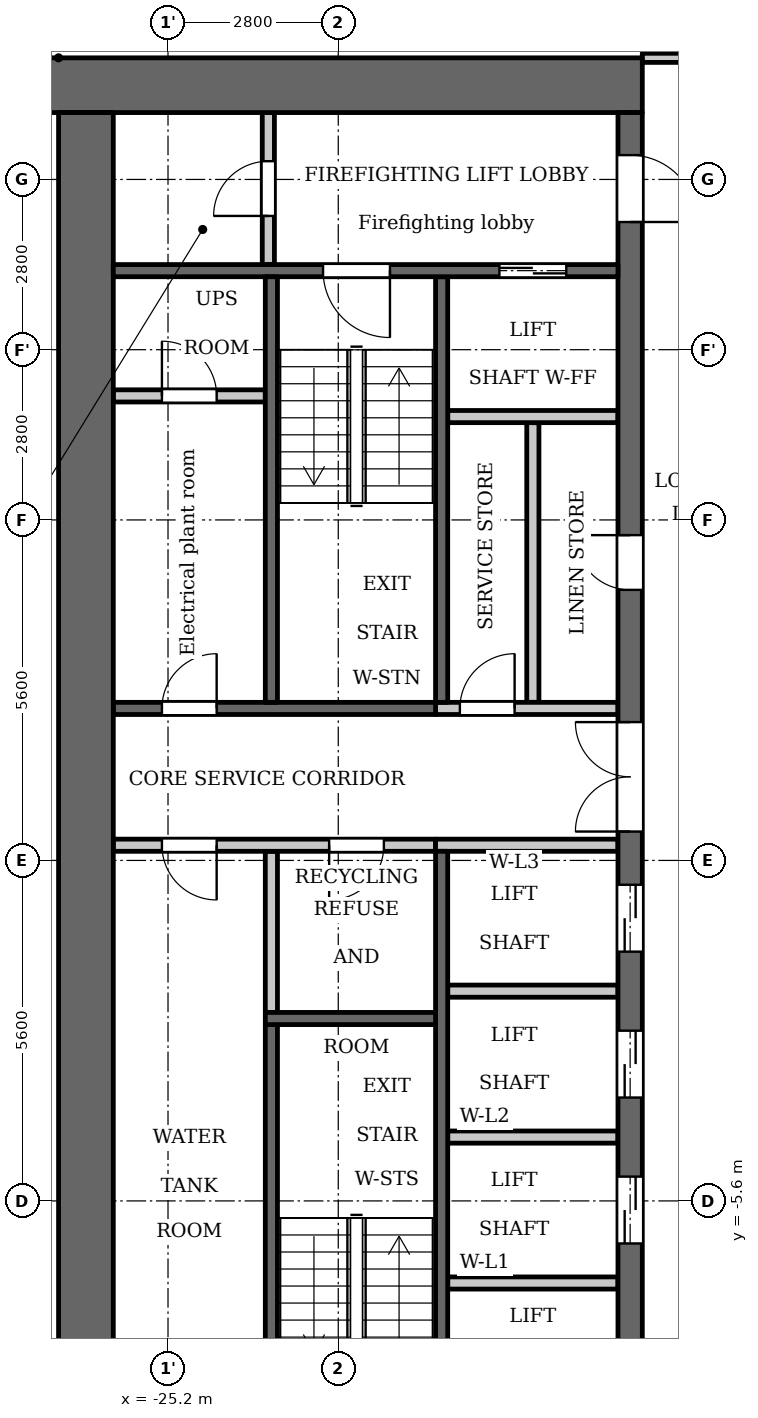
"""IFC4 building model, lengths in metres.
Left out: names, types, materials, properties, quantities, classifications, styles, units other than length and angle.
Written with IfcOpenShell. Run it as: python <this file> out.ifc"""

import sys

from ifc_helpers import new_model, si_unit, direction, frame, frame_2d, origin, place, context, subcontext, project, spatial, rectangle, extrude, element, fill, save


model = new_model("IFC4")
c1 = context("Model", 3, precision=1e-05, world=origin(), true_north=direction((0.0, 1.0)))
c2 = subcontext(c1, "Body", "Model", "MODEL_VIEW")
j1 = project(units=[si_unit("LENGTHUNIT", "METRE"), si_unit("PLANEANGLEUNIT", "RADIAN")], contexts=[c1])
p1 = place(None, origin())
s1 = spatial("IfcSite", under=j1, at=p1, CompositionType="ELEMENT")
p2 = place(p1, origin())
s2 = spatial("IfcBuilding", under=s1, at=p2, CompositionType="ELEMENT")
p3 = place(p2, frame((0.0, 0.0, 62.0)))
s3 = spatial("IfcBuildingStorey", under=s2, at=p3, CompositionType="ELEMENT", Elevation=62.0)
p4 = place(p3, frame((-23.5, -2.5, 0.0), z_axis=(0.0, 0.0, 1.0), x_axis=(0.0, 1.0, 0.0)))
e1 = element("IfcWall", 1, at=p4, inside=s3, PredefinedType="PARTITIONING", context=c2, shape_type="SweptSolid", body=[
    extrude(rectangle(XDim=2.65, YDim=0.2, at=frame_2d((1.325, 0.0))), origin(), (0.0, 0.0, 1.0), 3.2),
])
p5 = place(p3, frame((-20.7, 2.6, 0.0), z_axis=(0.0, 0.0, 1.0), x_axis=(0.0, 1.0, 0.0)))
e2 = element("IfcWall", 2, at=p5, inside=s3, PredefinedType="SHEAR", context=c2, shape_type="SweptSolid", body=[
    extrude(rectangle(XDim=7.0, YDim=0.2, at=frame_2d((3.5, 0.0))), origin(), (0.0, 0.0, 1.0), 3.2),
])
p6 = place(p3, frame((-20.7, -9.6, 0.0), z_axis=(0.0, 0.0, 1.0), x_axis=(0.0, 1.0, 0.0)))
e3 = element("IfcWall", 3, at=p6, inside=s3, PredefinedType="SHEAR", context=c2, shape_type="SweptSolid", body=[
    extrude(rectangle(XDim=9.75, YDim=0.2, at=frame_2d((4.875, 0.0))), origin(), (0.0, 0.0, 1.0), 3.2),
])
p7 = place(p3, frame((-20.8, 2.5, 0.0), z_axis=(0.0, 0.0, 1.0), x_axis=(-1.0, 0.0, 0.0)))
e4 = element("IfcWall", 4, at=p7, inside=s3, PredefinedType="SHEAR", context=c2, shape_type="SweptSolid", body=[
    extrude(rectangle(XDim=5.3, YDim=0.2, at=frame_2d((2.65, 0.0))), origin(), (0.0, 0.0, 1.0), 3.2),
])
p8 = place(p7, frame((3.6, 0.0, 0.0)))
e5 = element("IfcOpeningElement", 5, at=p8, cuts=e4, PredefinedType="OPENING", context=c2, shape_type="SweptSolid", body=[
    extrude(rectangle(XDim=0.9, YDim=2.1, at=frame_2d((0.45, 1.05))), frame((0.0, 0.11, 0.0), z_axis=(0.0, -1.0, 0.0), x_axis=(1.0, 0.0, 0.0)), (0.0, 0.0, 1.0), 0.22),
])
p9 = place(p3, frame((-20.8, 0.25, 0.0), z_axis=(0.0, 0.0, 1.0), x_axis=(-1.0, 0.0, 0.0)))
e6 = element("IfcWall", 6, at=p9, inside=s3, PredefinedType="PARTITIONING", context=c2, shape_type="SweptSolid", body=[
    extrude(rectangle(XDim=5.3, YDim=0.2, at=frame_2d((2.65, 0.0))), origin(), (0.0, 0.0, 1.0), 3.2),
])
p10 = place(p9, frame((0.85, 0.0, 0.0)))
e7 = element("IfcOpeningElement", 7, at=p10, cuts=e6, PredefinedType="OPENING", context=c2, shape_type="SweptSolid", body=[
    extrude(rectangle(XDim=0.9, YDim=2.1, at=frame_2d((0.45, 1.05))), frame((0.0, 0.11, 0.0), z_axis=(0.0, -1.0, 0.0), x_axis=(1.0, 0.0, 0.0)), (0.0, 0.0, 1.0), 0.22),
])
p11 = place(p9, frame((3.6, 0.0, 0.0)))
e8 = element("IfcOpeningElement", 8, at=p11, cuts=e6, PredefinedType="OPENING", context=c2, shape_type="SweptSolid", body=[
    extrude(rectangle(XDim=0.9, YDim=2.1, at=frame_2d((0.45, 1.05))), frame((0.0, 0.11, 0.0), z_axis=(0.0, -1.0, 0.0), x_axis=(1.0, 0.0, 0.0)), (0.0, 0.0, 1.0), 0.22),
])
p12 = place(p3, frame((-17.4, 12.75, 0.0), z_axis=(0.0, 0.0, 1.0), x_axis=(-1.0, 0.0, 0.0)))
e9 = element("IfcWall", 9, at=p12, inside=s3, PredefinedType="SHEAR", context=c2, shape_type="SweptSolid", body=[
    extrude(rectangle(XDim=10.4, YDim=0.9, at=frame_2d((5.2, 0.0))), origin(), (0.0, 0.0, 1.0), 3.2),
])
p13 = place(p3, frame((-19.2, 2.6, 0.0), z_axis=(0.0, 0.0, 1.0), x_axis=(0.0, 1.0, 0.0)))
e10 = element("IfcWall", 10, at=p13, inside=s3, PredefinedType="PARTITIONING", context=c2, shape_type="SweptSolid", body=[
    extrude(rectangle(XDim=4.6, YDim=0.2, at=frame_2d((2.3, 0.0))), origin(), (0.0, 0.0, 1.0), 3.2),
])
p14 = place(p3, frame((-17.6, -12.3, 0.0), z_axis=(0.0, 0.0, 1.0), x_axis=(0.0, 1.0, 0.0)))
e11 = element("IfcWall", 11, at=p14, inside=s3, PredefinedType="SHEAR", context=c2, shape_type="SweptSolid", body=[
    extrude(rectangle(XDim=24.6, YDim=0.4, at=frame_2d((12.3, 0.0))), origin(), (0.0, 0.0, 1.0), 3.2),
])
p15 = place(p14, frame((6.0, 0.0, 0.0)))
e12 = element("IfcOpeningElement", 12, at=p15, cuts=e11, PredefinedType="OPENING", context=c2, shape_type="SweptSolid", body=[
    extrude(rectangle(XDim=1.1, YDim=2.1, at=frame_2d((0.55, 1.05))), frame((0.0, 0.21, 0.0), z_axis=(0.0, -1.0, 0.0), x_axis=(1.0, 0.0, 0.0)), (0.0, 0.0, 1.0), 0.42),
])
p16 = place(p14, frame((8.4, 0.0, 0.0)))
e13 = element("IfcOpeningElement", 13, at=p16, cuts=e11, PredefinedType="OPENING", context=c2, shape_type="SweptSolid", body=[
    extrude(rectangle(XDim=1.1, YDim=2.1, at=frame_2d((0.55, 1.05))), frame((0.0, 0.21, 0.0), z_axis=(0.0, -1.0, 0.0), x_axis=(1.0, 0.0, 0.0)), (0.0, 0.0, 1.0), 0.42),
])
p17 = place(p14, frame((10.8, 0.0, 0.0)))
e14 = element("IfcOpeningElement", 14, at=p17, cuts=e11, PredefinedType="OPENING", context=c2, shape_type="SweptSolid", body=[
    extrude(rectangle(XDim=1.1, YDim=2.1, at=frame_2d((0.55, 1.05))), frame((0.0, 0.21, 0.0), z_axis=(0.0, -1.0, 0.0), x_axis=(1.0, 0.0, 0.0)), (0.0, 0.0, 1.0), 0.42),
])
p18 = place(p14, frame((16.75, 0.0, 0.0)))
e15 = element("IfcOpeningElement", 15, at=p18, cuts=e11, PredefinedType="OPENING", context=c2, shape_type="SweptSolid", body=[
    extrude(rectangle(XDim=0.9, YDim=2.1, at=frame_2d((0.45, 1.05))), frame((0.0, 0.21, 0.0), z_axis=(0.0, -1.0, 0.0), x_axis=(1.0, 0.0, 0.0)), (0.0, 0.0, 1.0), 0.42),
])
p19 = place(p14, frame((22.8, 0.0, 0.0)))
e16 = element("IfcOpeningElement", 16, at=p19, cuts=e11, PredefinedType="OPENING", context=c2, shape_type="SweptSolid", body=[
    extrude(rectangle(XDim=1.1, YDim=2.1, at=frame_2d((0.55, 1.05))), frame((0.0, 0.21, 0.0), z_axis=(0.0, -1.0, 0.0), x_axis=(1.0, 0.0, 0.0)), (0.0, 0.0, 1.0), 0.42),
])
p20 = place(p14, frame((0.7, 0.0, 0.0)))
e17 = element("IfcOpeningElement", 17, at=p20, cuts=e11, PredefinedType="OPENING", context=c2, shape_type="SweptSolid", body=[
    extrude(rectangle(XDim=1.1, YDim=2.1, at=frame_2d((0.55, 1.05))), frame((0.0, 0.21, 0.0), z_axis=(0.0, -1.0, 0.0), x_axis=(1.0, 0.0, 0.0)), (0.0, 0.0, 1.0), 0.42),
])
p21 = place(p14, frame((12.775, 0.0, 0.0)))
e18 = element("IfcOpeningElement", 18, at=p21, cuts=e11, PredefinedType="OPENING", context=c2, shape_type="SweptSolid", body=[
    extrude(rectangle(XDim=1.8, YDim=2.1, at=frame_2d((0.9, 1.05))), frame((0.0, 0.21, 0.0), z_axis=(0.0, -1.0, 0.0), x_axis=(1.0, 0.0, 0.0)), (0.0, 0.0, 1.0), 0.42),
])
p22 = place(p3, frame((-26.55, -12.3, 0.0), z_axis=(0.0, 0.0, 1.0), x_axis=(0.0, 1.0, 0.0)))
e19 = element("IfcWall", 19, at=p22, inside=s3, PredefinedType="SHEAR", context=c2, shape_type="SweptSolid", body=[
    extrude(rectangle(XDim=24.6, YDim=0.9, at=frame_2d((12.3, 0.0))), origin(), (0.0, 0.0, 1.0), 3.2),
])
p23 = place(p3, frame((-23.55, 9.8, 0.0), z_axis=(0.0, 0.0, 1.0), x_axis=(0.0, 1.0, 0.0)))
e20 = element("IfcWall", 20, at=p23, inside=s3, PredefinedType="PARTITIONING", context=c2, shape_type="SweptSolid", body=[
    extrude(rectangle(XDim=2.5, YDim=0.2, at=frame_2d((1.25, 0.0))), origin(), (0.0, 0.0, 1.0), 3.2),
])
p24 = place(p23, frame((0.8, 0.0, 0.0)))
e21 = element("IfcOpeningElement", 21, at=p24, cuts=e20, PredefinedType="OPENING", context=c2, shape_type="SweptSolid", body=[
    extrude(rectangle(XDim=0.9, YDim=2.1, at=frame_2d((0.45, 1.05))), frame((0.0, 0.11, 0.0), z_axis=(0.0, -1.0, 0.0), x_axis=(1.0, 0.0, 0.0)), (0.0, 0.0, 1.0), 0.22),
])
p25 = place(p3, frame((-23.6, 7.64, 0.0), z_axis=(0.0, 0.0, 1.0), x_axis=(-1.0, 0.0, 0.0)))
e22 = element("IfcWall", 22, at=p25, inside=s3, PredefinedType="PARTITIONING", context=c2, shape_type="SweptSolid", body=[
    extrude(rectangle(XDim=2.5, YDim=0.2, at=frame_2d((1.25, 0.0))), origin(), (0.0, 0.0, 1.0), 3.2),
])
p26 = place(p25, frame((0.8, 0.0, 0.0)))
e23 = element("IfcOpeningElement", 23, at=p26, cuts=e22, PredefinedType="OPENING", context=c2, shape_type="SweptSolid", body=[
    extrude(rectangle(XDim=0.9, YDim=2.1, at=frame_2d((0.45, 1.05))), frame((0.0, 0.11, 0.0), z_axis=(0.0, -1.0, 0.0), x_axis=(1.0, 0.0, 0.0)), (0.0, 0.0, 1.0), 0.22),
])
for number, where, z_axis, x_axis in (
    (24, (-17.8, -6.95, 0.0), (0.0, 0.0, 1.0), (-1.0, 0.0, 0.0)),
    (25, (-17.8, -4.55, 0.0), (0.0, 0.0, 1.0), (-1.0, 0.0, 0.0)),
    (26, (-17.8, -2.15, 0.0), (0.0, 0.0, 1.0), (-1.0, 0.0, 0.0)),
):
    element("IfcWall", number, at=place(p3, frame(where, z_axis=z_axis, x_axis=x_axis)), inside=s3, PredefinedType="PARTITIONING", context=c2, shape_type="SweptSolid", body=[
        extrude(rectangle(XDim=2.8, YDim=0.2, at=frame_2d((1.4, 0.0))), origin(), (0.0, 0.0, 1.0), 3.2),
    ])
p27 = place(p3, frame((-17.8, 0.25, 0.0), z_axis=(0.0, 0.0, 1.0), x_axis=(-1.0, 0.0, 0.0)))
e27 = element("IfcWall", 27, at=p27, inside=s3, PredefinedType="PARTITIONING", context=c2, shape_type="SweptSolid", body=[
    extrude(rectangle(XDim=3.0, YDim=0.2, at=frame_2d((1.5, 0.0))), origin(), (0.0, 0.0, 1.0), 3.2),
])
p28 = place(p3, frame((-17.8, 2.5, 0.0), z_axis=(0.0, 0.0, 1.0), x_axis=(-1.0, 0.0, 0.0)))
e28 = element("IfcWall", 28, at=p28, inside=s3, PredefinedType="PARTITIONING", context=c2, shape_type="SweptSolid", body=[
    extrude(rectangle(XDim=3.0, YDim=0.2, at=frame_2d((1.5, 0.0))), origin(), (0.0, 0.0, 1.0), 3.2),
])
p29 = place(p28, frame((1.7, 0.0, 0.0)))
e29 = element("IfcOpeningElement", 29, at=p29, cuts=e28, PredefinedType="OPENING", context=c2, shape_type="SweptSolid", body=[
    extrude(rectangle(XDim=0.9, YDim=2.1, at=frame_2d((0.45, 1.05))), frame((0.0, 0.11, 0.0), z_axis=(0.0, -1.0, 0.0), x_axis=(1.0, 0.0, 0.0)), (0.0, 0.0, 1.0), 0.22),
])
p30 = place(p3, frame((-17.8, 7.3, 0.0), z_axis=(0.0, 0.0, 1.0), x_axis=(-1.0, 0.0, 0.0)))
e30 = element("IfcWall", 30, at=p30, inside=s3, PredefinedType="PARTITIONING", context=c2, shape_type="SweptSolid", body=[
    extrude(rectangle(XDim=2.8, YDim=0.2, at=frame_2d((1.4, 0.0))), origin(), (0.0, 0.0, 1.0), 3.2),
])
p31 = place(p3, frame((-17.8, 9.7, 0.0), z_axis=(0.0, 0.0, 1.0), x_axis=(-1.0, 0.0, 0.0)))
e31 = element("IfcWall", 31, at=p31, inside=s3, PredefinedType="SHEAR", context=c2, shape_type="SweptSolid", body=[
    extrude(rectangle(XDim=8.3, YDim=0.2, at=frame_2d((4.15, 0.0))), origin(), (0.0, 0.0, 1.0), 3.2),
])
p32 = place(p31, frame((0.85, 0.0, 0.0)))
e32 = element("IfcOpeningElement", 32, at=p32, cuts=e31, PredefinedType="OPENING", context=c2, shape_type="SweptSolid", body=[
    extrude(rectangle(XDim=1.1, YDim=2.1, at=frame_2d((0.55, 1.05))), frame((0.0, 0.11, 0.0), z_axis=(0.0, -1.0, 0.0), x_axis=(1.0, 0.0, 0.0)), (0.0, 0.0, 1.0), 0.22),
])
p33 = place(p31, frame((3.75, 0.0, 0.0)))
e33 = element("IfcOpeningElement", 33, at=p33, cuts=e31, PredefinedType="OPENING", context=c2, shape_type="SweptSolid", body=[
    extrude(rectangle(XDim=1.1, YDim=2.1, at=frame_2d((0.55, 1.05))), frame((0.0, 0.11, 0.0), z_axis=(0.0, -1.0, 0.0), x_axis=(1.0, 0.0, 0.0)), (0.0, 0.0, 1.0), 0.22),
])
p34 = place(p3, frame((-23.5, 2.6, 0.0), z_axis=(0.0, 0.0, 1.0), x_axis=(0.0, 1.0, 0.0)))
e34 = element("IfcWall", 34, at=p34, inside=s3, PredefinedType="SHEAR", context=c2, shape_type="SweptSolid", body=[
    extrude(rectangle(XDim=7.0, YDim=0.2, at=frame_2d((3.5, 0.0))), origin(), (0.0, 0.0, 1.0), 3.2),
])
p35 = place(p3, frame((-23.5, -9.6, 0.0), z_axis=(0.0, 0.0, 1.0), x_axis=(0.0, 1.0, 0.0)))
e35 = element("IfcWall", 35, at=p35, inside=s3, PredefinedType="SHEAR", context=c2, shape_type="SweptSolid", body=[
    extrude(rectangle(XDim=6.9, YDim=0.2, at=frame_2d((3.45, 0.0))), origin(), (0.0, 0.0, 1.0), 3.2),
])
p36 = place(p3, frame((-20.8, -2.6, 0.0), z_axis=(0.0, 0.0, 1.0), x_axis=(-1.0, 0.0, 0.0)))
e36 = element("IfcWall", 36, at=p36, inside=s3, PredefinedType="SHEAR", context=c2, shape_type="SweptSolid", body=[
    extrude(rectangle(XDim=2.8, YDim=0.2, at=frame_2d((1.4, 0.0))), origin(), (0.0, 0.0, 1.0), 3.2),
])
p37 = place(p3, frame((-17.4, 13.2, 0.0), z_axis=(0.0, 0.0, 1.0), x_axis=(1.0, 0.0, 0.0)))
e37 = element("IfcWall", 37, at=p37, inside=s3, PredefinedType="PARTITIONING", context=c2, shape_type="SweptSolid", body=[
    extrude(rectangle(XDim=34.8, YDim=0.15, at=frame_2d((17.4, 0.0))), origin(), (0.0, 0.0, 1.0), 3.2),
])
p38 = place(p37, frame((0.75, 0.0, 0.0)))
e38 = element("IfcOpeningElement", 38, at=p38, cuts=e37, PredefinedType="OPENING", context=c2, shape_type="SweptSolid", body=[
    extrude(rectangle(XDim=1.0, YDim=2.1, at=frame_2d((0.5, 1.05))), frame((0.0, 0.085, 0.0), z_axis=(0.0, -1.0, 0.0), x_axis=(1.0, 0.0, 0.0)), (0.0, 0.0, 1.0), 0.17),
])
p39 = place(p37, frame((33.15, 0.0, 0.0)))
e39 = element("IfcOpeningElement", 39, at=p39, cuts=e37, PredefinedType="OPENING", context=c2, shape_type="SweptSolid", body=[
    extrude(rectangle(XDim=1.0, YDim=2.1, at=frame_2d((0.5, 1.05))), frame((0.0, 0.085, 0.0), z_axis=(0.0, -1.0, 0.0), x_axis=(1.0, 0.0, 0.0)), (0.0, 0.0, 1.0), 0.17),
])
p40 = place(p37, frame((6.85, 0.0, 0.0)))
e40 = element("IfcOpeningElement", 40, at=p40, cuts=e37, PredefinedType="OPENING", context=c2, shape_type="SweptSolid", body=[
    extrude(rectangle(XDim=1.0, YDim=2.1, at=frame_2d((0.5, 1.05))), frame((0.0, 0.085, 0.0), z_axis=(0.0, -1.0, 0.0), x_axis=(1.0, 0.0, 0.0)), (0.0, 0.0, 1.0), 0.17),
])
p41 = place(p37, frame((12.45, 0.0, 0.0)))
e41 = element("IfcOpeningElement", 41, at=p41, cuts=e37, PredefinedType="OPENING", context=c2, shape_type="SweptSolid", body=[
    extrude(rectangle(XDim=1.0, YDim=2.1, at=frame_2d((0.5, 1.05))), frame((0.0, 0.085, 0.0), z_axis=(0.0, -1.0, 0.0), x_axis=(1.0, 0.0, 0.0)), (0.0, 0.0, 1.0), 0.17),
])
p42 = place(p37, frame((23.65, 0.0, 0.0)))
e42 = element("IfcOpeningElement", 42, at=p42, cuts=e37, PredefinedType="OPENING", context=c2, shape_type="SweptSolid", body=[
    extrude(rectangle(XDim=1.0, YDim=2.1, at=frame_2d((0.5, 1.05))), frame((0.0, 0.085, 0.0), z_axis=(0.0, -1.0, 0.0), x_axis=(1.0, 0.0, 0.0)), (0.0, 0.0, 1.0), 0.17),
])
p43 = place(p15, origin())
e43 = element("IfcDoor", 43, at=p43, inside=s3, OperationType="DOUBLE_DOOR_SLIDING", PredefinedType="DOOR", context=c2, shape_type="SweptSolid", body=[
    extrude(rectangle(XDim=1.1, YDim=2.1, at=frame_2d((0.55, 1.05))), frame((0.0, 0.025, 0.0), z_axis=(0.0, -1.0, 0.0), x_axis=(1.0, 0.0, 0.0)), (0.0, 0.0, 1.0), 0.05),
])
fill(e12, e43)
p44 = place(p16, origin())
e44 = element("IfcDoor", 44, at=p44, inside=s3, OperationType="DOUBLE_DOOR_SLIDING", PredefinedType="DOOR", context=c2, shape_type="SweptSolid", body=[
    extrude(rectangle(XDim=1.1, YDim=2.1, at=frame_2d((0.55, 1.05))), frame((0.0, 0.025, 0.0), z_axis=(0.0, -1.0, 0.0), x_axis=(1.0, 0.0, 0.0)), (0.0, 0.0, 1.0), 0.05),
])
fill(e13, e44)
p45 = place(p17, origin())
e45 = element("IfcDoor", 45, at=p45, inside=s3, OperationType="DOUBLE_DOOR_SLIDING", PredefinedType="DOOR", context=c2, shape_type="SweptSolid", body=[
    extrude(rectangle(XDim=1.1, YDim=2.1, at=frame_2d((0.55, 1.05))), frame((0.0, 0.025, 0.0), z_axis=(0.0, -1.0, 0.0), x_axis=(1.0, 0.0, 0.0)), (0.0, 0.0, 1.0), 0.05),
])
fill(e14, e45)
p46 = place(p18, origin())
e46 = element("IfcDoor", 46, at=p46, inside=s3, OperationType="SINGLE_SWING_LEFT", PredefinedType="DOOR", context=c2, shape_type="SweptSolid", body=[
    extrude(rectangle(XDim=0.9, YDim=2.1, at=frame_2d((0.45, 1.05))), frame((0.0, 0.025, 0.0), z_axis=(0.0, -1.0, 0.0), x_axis=(1.0, 0.0, 0.0)), (0.0, 0.0, 1.0), 0.05),
])
fill(e15, e46)
p47 = place(p29, origin())
e47 = element("IfcDoor", 47, at=p47, inside=s3, OperationType="SINGLE_SWING_LEFT", PredefinedType="DOOR", context=c2, shape_type="SweptSolid", body=[
    extrude(rectangle(XDim=0.9, YDim=2.1, at=frame_2d((0.45, 1.05))), frame((0.0, 0.025, 0.0), z_axis=(0.0, -1.0, 0.0), x_axis=(1.0, 0.0, 0.0)), (0.0, 0.0, 1.0), 0.05),
])
fill(e29, e47)
p48 = place(p32, origin())
e48 = element("IfcDoor", 48, at=p48, inside=s3, OperationType="DOUBLE_DOOR_SLIDING", PredefinedType="DOOR", context=c2, shape_type="SweptSolid", body=[
    extrude(rectangle(XDim=1.1, YDim=2.1, at=frame_2d((0.55, 1.05))), frame((0.0, 0.025, 0.0), z_axis=(0.0, -1.0, 0.0), x_axis=(1.0, 0.0, 0.0)), (0.0, 0.0, 1.0), 0.05),
])
fill(e32, e48)
p49 = place(p19, origin())
e49 = element("IfcDoor", 49, at=p49, inside=s3, OperationType="SINGLE_SWING_LEFT", PredefinedType="DOOR", context=c2, shape_type="SweptSolid", body=[
    extrude(rectangle(XDim=1.1, YDim=2.1, at=frame_2d((0.55, 1.05))), frame((0.0, 0.025, 0.0), z_axis=(0.0, -1.0, 0.0), x_axis=(1.0, 0.0, 0.0)), (0.0, 0.0, 1.0), 0.05),
])
fill(e16, e49)
p50 = place(p24, origin())
e50 = element("IfcDoor", 50, at=p50, inside=s3, OperationType="SINGLE_SWING_RIGHT", PredefinedType="DOOR", context=c2, shape_type="SweptSolid", body=[
    extrude(rectangle(XDim=0.9, YDim=2.1, at=frame_2d((0.45, 1.05))), frame((0.0, 0.025, 0.0), z_axis=(0.0, -1.0, 0.0), x_axis=(1.0, 0.0, 0.0)), (0.0, 0.0, 1.0), 0.05),
])
fill(e21, e50)
p51 = place(p33, origin())
e51 = element("IfcDoor", 51, at=p51, inside=s3, OperationType="SINGLE_SWING_RIGHT", PredefinedType="DOOR", context=c2, shape_type="SweptSolid", body=[
    extrude(rectangle(XDim=1.1, YDim=2.1, at=frame_2d((0.55, 1.05))), frame((0.0, 0.025, 0.0), z_axis=(0.0, -1.0, 0.0), x_axis=(1.0, 0.0, 0.0)), (0.0, 0.0, 1.0), 0.05),
])
fill(e33, e51)
p52 = place(p21, origin())
e52 = element("IfcDoor", 52, at=p52, inside=s3, OperationType="DOUBLE_DOOR_SINGLE_SWING", PredefinedType="DOOR", context=c2, shape_type="SweptSolid", body=[
    extrude(rectangle(XDim=1.8, YDim=2.1, at=frame_2d((0.9, 1.05))), frame((0.0, 0.025, 0.0), z_axis=(0.0, -1.0, 0.0), x_axis=(1.0, 0.0, 0.0)), (0.0, 0.0, 1.0), 0.05),
])
fill(e18, e52)
p53 = place(p10, origin())
e53 = element("IfcDoor", 53, at=p53, inside=s3, OperationType="SINGLE_SWING_LEFT", PredefinedType="DOOR", context=c2, shape_type="SweptSolid", body=[
    extrude(rectangle(XDim=0.9, YDim=2.1, at=frame_2d((0.45, 1.05))), frame((0.0, 0.025, 0.0), z_axis=(0.0, -1.0, 0.0), x_axis=(1.0, 0.0, 0.0)), (0.0, 0.0, 1.0), 0.05),
])
fill(e7, e53)
p54 = place(p11, origin())
e54 = element("IfcDoor", 54, at=p54, inside=s3, OperationType="SINGLE_SWING_RIGHT", PredefinedType="DOOR", context=c2, shape_type="SweptSolid", body=[
    extrude(rectangle(XDim=0.9, YDim=2.1, at=frame_2d((0.45, 1.05))), frame((0.0, 0.025, 0.0), z_axis=(0.0, -1.0, 0.0), x_axis=(1.0, 0.0, 0.0)), (0.0, 0.0, 1.0), 0.05),
])
fill(e8, e54)
p55 = place(p26, origin())
e55 = element("IfcDoor", 55, at=p55, inside=s3, OperationType="SINGLE_SWING_RIGHT", PredefinedType="DOOR", context=c2, shape_type="SweptSolid", body=[
    extrude(rectangle(XDim=0.9, YDim=2.1, at=frame_2d((0.45, 1.05))), frame((0.0, 0.025, 0.0), z_axis=(0.0, -1.0, 0.0), x_axis=(1.0, 0.0, 0.0)), (0.0, 0.0, 1.0), 0.05),
])
fill(e23, e55)
p56 = place(p8, origin())
e56 = element("IfcDoor", 56, at=p56, inside=s3, OperationType="SINGLE_SWING_LEFT", PredefinedType="DOOR", context=c2, shape_type="SweptSolid", body=[
    extrude(rectangle(XDim=0.9, YDim=2.1, at=frame_2d((0.45, 1.05))), frame((0.0, 0.025, 0.0), z_axis=(0.0, -1.0, 0.0), x_axis=(1.0, 0.0, 0.0)), (0.0, 0.0, 1.0), 0.05),
])
fill(e5, e56)
save(model, sys.argv[1])
